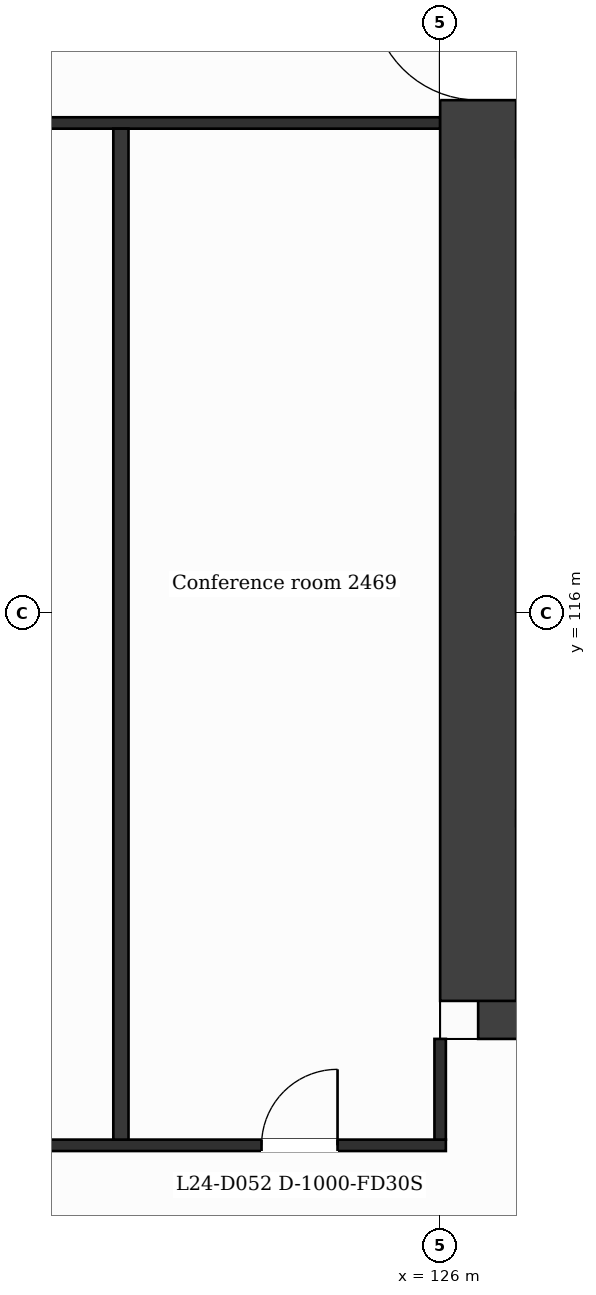
"""IFC4 building model, lengths in metres.
Left out: names, types, materials, properties, quantities, classifications, styles, units other than length and angle.
Written with IfcOpenShell. Run it as: python <this file> out.ifc"""

import sys

from ifc_helpers import new_model, si_unit, direction, frame, frame_2d, origin, place, context, subcontext, project, spatial, rectangle, extrude, element, fill, save


model = new_model("IFC4")
c1 = context("Model", 3, precision=1e-05, world=origin(), true_north=direction((0.0, 1.0)))
c2 = subcontext(c1, "Body", "Model", "MODEL_VIEW")
j1 = project(units=[si_unit("LENGTHUNIT", "METRE"), si_unit("PLANEANGLEUNIT", "RADIAN")], contexts=[c1])
p1 = place(None, origin())
s1 = spatial("IfcSite", under=j1, at=p1, CompositionType="ELEMENT")
p2 = place(p1, origin())
s2 = spatial("IfcBuilding", under=s1, at=p2, CompositionType="ELEMENT")
p3 = place(p2, frame((0.0, 0.0, 105.8)))
s3 = spatial("IfcBuildingStorey", under=s2, at=p3, CompositionType="ELEMENT", Elevation=105.8)
p4 = place(p3, frame((140.559, 110.9, 0.0), z_axis=(0.0, 0.0, 1.0), x_axis=(-1.0, 0.0, 0.0)))
e1 = element("IfcWall", 1, at=p4, inside=s3, PredefinedType="SHEAR", context=c2, shape_type="SweptSolid", body=[
    extrude(rectangle(XDim=14.059, YDim=1.0, at=frame_2d((7.029, 0.0))), origin(), (0.0, 0.0, 1.0), 3.7),
])
p5 = place(p4, frame((6.858, 0.0, 0.0)))
e2 = element("IfcOpeningElement", 2, at=p5, cuts=e1, PredefinedType="OPENING", context=c2, shape_type="SweptSolid", body=[
    extrude(rectangle(XDim=1.4, YDim=2.1, at=frame_2d((0.7, 1.05))), frame((0.0, 0.51, 0.0), z_axis=(0.0, -1.0, 0.0), x_axis=(1.0, 0.0, 0.0)), (0.0, 0.0, 1.0), 1.02),
])
p6 = place(p3, frame((126.5, 110.9, 0.0), z_axis=(0.0, 0.0, 1.0), x_axis=(0.0, 1.0, 0.0)))
e3 = element("IfcWall", 3, at=p6, inside=s3, PredefinedType="SHEAR", context=c2, shape_type="SweptSolid", body=[
    extrude(rectangle(XDim=21.0, YDim=1.0, at=frame_2d((10.5, 0.0))), origin(), (0.0, 0.0, 1.0), 3.7),
])
p7 = place(p6, frame((11.85, 0.0, 0.0)))
e4 = element("IfcOpeningElement", 4, at=p7, cuts=e3, PredefinedType="OPENING", context=c2, shape_type="SweptSolid", body=[
    extrude(rectangle(XDim=1.4, YDim=2.1, at=frame_2d((0.7, 1.05))), frame((0.0, 0.51, 0.0), z_axis=(0.0, -1.0, 0.0), x_axis=(1.0, 0.0, 0.0)), (0.0, 0.0, 1.0), 1.02),
])
p8 = place(p3, frame((100.725, 109.0, 0.0), z_axis=(0.0, 0.0, 1.0), x_axis=(1.0, 0.0, 0.0)))
e5 = element("IfcWall", 5, at=p8, inside=s3, PredefinedType="PARTITIONING", context=c2, shape_type="SweptSolid", body=[
    extrude(rectangle(XDim=25.35, YDim=0.15, at=frame_2d((12.675, 0.0))), origin(), (0.0, 0.0, 1.0), 3.38),
])
p9 = place(p8, frame((2.3, 0.0, 0.0)))
e6 = element("IfcOpeningElement", 6, at=p9, cuts=e5, PredefinedType="OPENING", context=c2, shape_type="SweptSolid", body=[
    extrude(rectangle(XDim=1.0, YDim=2.1, at=frame_2d((0.5, 1.05))), frame((0.0, 0.085, 0.0), z_axis=(0.0, -1.0, 0.0), x_axis=(1.0, 0.0, 0.0)), (0.0, 0.0, 1.0), 0.17),
])
p10 = place(p8, frame((6.125, 0.0, 0.0)))
e7 = element("IfcOpeningElement", 7, at=p10, cuts=e5, PredefinedType="OPENING", context=c2, shape_type="SweptSolid", body=[
    extrude(rectangle(XDim=1.0, YDim=2.1, at=frame_2d((0.5, 1.05))), frame((0.0, 0.085, 0.0), z_axis=(0.0, -1.0, 0.0), x_axis=(1.0, 0.0, 0.0)), (0.0, 0.0, 1.0), 0.17),
])
p11 = place(p8, frame((10.075, 0.0, 0.0)))
e8 = element("IfcOpeningElement", 8, at=p11, cuts=e5, PredefinedType="OPENING", context=c2, shape_type="SweptSolid", body=[
    extrude(rectangle(XDim=1.0, YDim=2.1, at=frame_2d((0.5, 1.05))), frame((0.0, 0.085, 0.0), z_axis=(0.0, -1.0, 0.0), x_axis=(1.0, 0.0, 0.0)), (0.0, 0.0, 1.0), 0.17),
])
p12 = place(p8, frame((14.275, 0.0, 0.0)))
e9 = element("IfcOpeningElement", 9, at=p12, cuts=e5, PredefinedType="OPENING", context=c2, shape_type="SweptSolid", body=[
    extrude(rectangle(XDim=1.0, YDim=2.1, at=frame_2d((0.5, 1.05))), frame((0.0, 0.085, 0.0), z_axis=(0.0, -1.0, 0.0), x_axis=(1.0, 0.0, 0.0)), (0.0, 0.0, 1.0), 0.17),
])
p13 = place(p8, frame((17.85, 0.0, 0.0)))
e10 = element("IfcOpeningElement", 10, at=p13, cuts=e5, PredefinedType="OPENING", context=c2, shape_type="SweptSolid", body=[
    extrude(rectangle(XDim=1.0, YDim=2.1, at=frame_2d((0.5, 1.05))), frame((0.0, 0.085, 0.0), z_axis=(0.0, -1.0, 0.0), x_axis=(1.0, 0.0, 0.0)), (0.0, 0.0, 1.0), 0.17),
])
p14 = place(p8, frame((22.925, 0.0, 0.0)))
e11 = element("IfcOpeningElement", 11, at=p14, cuts=e5, PredefinedType="OPENING", context=c2, shape_type="SweptSolid", body=[
    extrude(rectangle(XDim=1.0, YDim=2.1, at=frame_2d((0.5, 1.05))), frame((0.0, 0.085, 0.0), z_axis=(0.0, -1.0, 0.0), x_axis=(1.0, 0.0, 0.0)), (0.0, 0.0, 1.0), 0.17),
])
p15 = place(p3, frame((127.0, 113.3, 0.0), z_axis=(0.0, 0.0, 1.0), x_axis=(1.0, 0.0, 0.0)))
e12 = element("IfcWall", 12, at=p15, inside=s3, PredefinedType="PARTITIONING", context=c2, shape_type="SweptSolid", body=[
    extrude(rectangle(XDim=4.673, YDim=0.2, at=frame_2d((2.336, 0.0))), origin(), (0.0, 0.0, 1.0), 3.38),
])
p16 = place(p15, frame((0.472, 0.0, 0.0)))
e13 = element("IfcOpeningElement", 13, at=p16, cuts=e12, PredefinedType="OPENING", context=c2, shape_type="SweptSolid", body=[
    extrude(rectangle(XDim=1.1, YDim=2.1, at=frame_2d((0.55, 1.05))), frame((0.0, 0.11, 0.0), z_axis=(0.0, -1.0, 0.0), x_axis=(1.0, 0.0, 0.0)), (0.0, 0.0, 1.0), 0.22),
])
p17 = place(p3, frame((100.8, 122.45, 0.0), z_axis=(0.0, 0.0, 1.0), x_axis=(1.0, 0.0, 0.0)))
e14 = element("IfcWall", 14, at=p17, inside=s3, PredefinedType="PARTITIONING", context=c2, shape_type="SweptSolid", body=[
    extrude(rectangle(XDim=25.2, YDim=0.15, at=frame_2d((12.6, 0.0))), origin(), (0.0, 0.0, 1.0), 3.38),
])
p18 = place(p3, frame((121.8, 109.075, 0.0), z_axis=(0.0, 0.0, 1.0), x_axis=(0.0, 1.0, 0.0)))
e15 = element("IfcWall", 15, at=p18, inside=s3, PredefinedType="PARTITIONING", context=c2, shape_type="SweptSolid", body=[
    extrude(rectangle(XDim=13.3, YDim=0.2, at=frame_2d((6.65, 0.0))), origin(), (0.0, 0.0, 1.0), 3.38),
])
p19 = place(p3, frame((126.0, 109.075, 0.0), z_axis=(0.0, 0.0, 1.0), x_axis=(0.0, 1.0, 0.0)))
e16 = element("IfcWall", 16, at=p19, inside=s3, PredefinedType="PARTITIONING", context=c2, shape_type="SweptSolid", body=[
    extrude(rectangle(XDim=1.325, YDim=0.15, at=frame_2d((0.663, 0.0))), origin(), (0.0, 0.0, 1.0), 3.38),
])
p20 = place(p14, origin())
e17 = element("IfcDoor", 17, at=p20, inside=s3, OperationType="SINGLE_SWING_RIGHT", PredefinedType="DOOR", context=c2, shape_type="SweptSolid", body=[
    extrude(rectangle(XDim=1.0, YDim=2.1, at=frame_2d((0.5, 1.05))), frame((0.0, 0.025, 0.0), z_axis=(0.0, -1.0, 0.0), x_axis=(1.0, 0.0, 0.0)), (0.0, 0.0, 1.0), 0.05),
])
fill(e11, e17)
p21 = place(p7, origin())
e18 = element("IfcDoor", 18, at=p21, inside=s3, OperationType="SINGLE_SWING_RIGHT", PredefinedType="DOOR", context=c2, shape_type="SweptSolid", body=[
    extrude(rectangle(XDim=1.4, YDim=2.1, at=frame_2d((0.7, 1.05))), frame((0.0, 0.025, 0.0), z_axis=(0.0, -1.0, 0.0), x_axis=(1.0, 0.0, 0.0)), (0.0, 0.0, 1.0), 0.05),
])
fill(e4, e18)
save(model, sys.argv[1])
